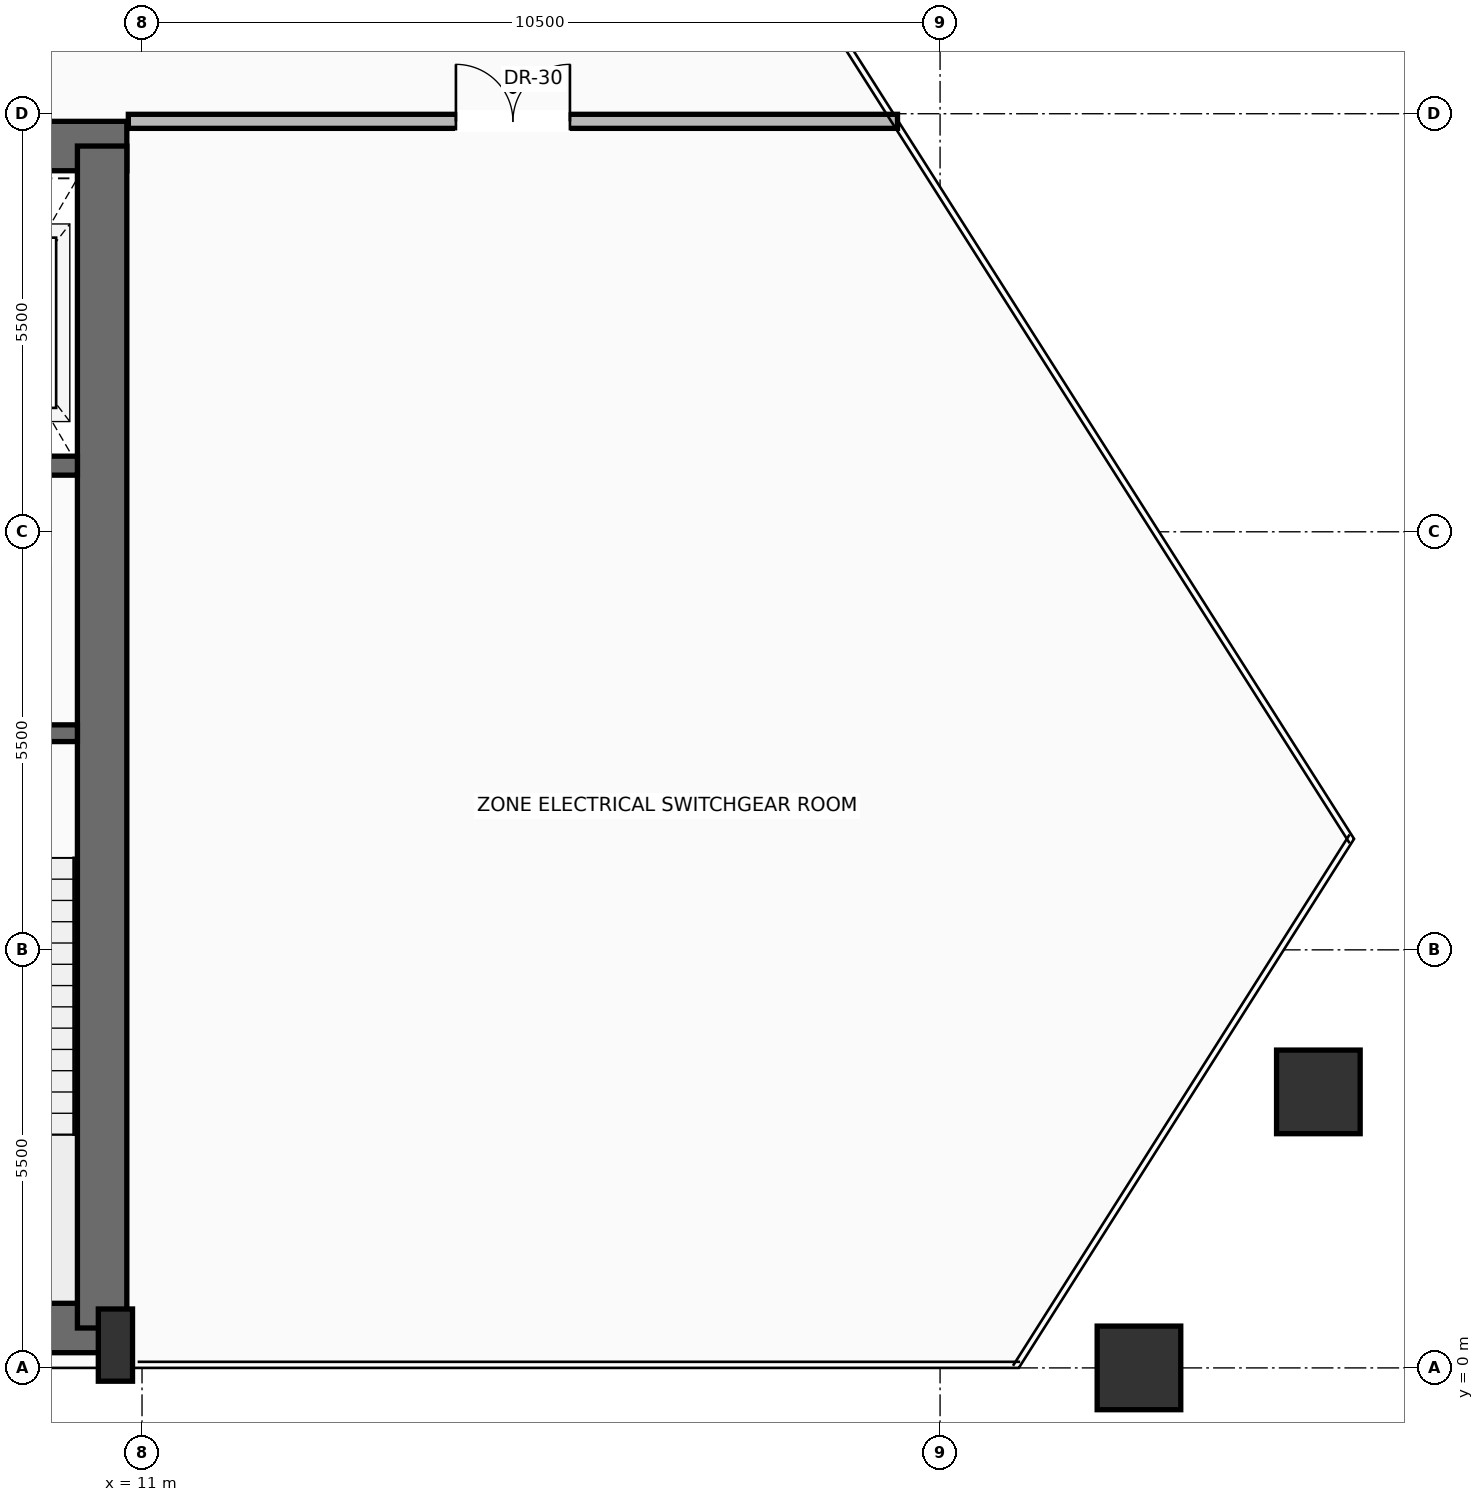
"""IFC4 building model, lengths in metres.
Left out: names, types, materials, properties, quantities, classifications, styles, units other than length and angle.
Written with IfcOpenShell. Run it as: python <this file> out.ifc"""

import sys

from ifc_helpers import new_model, si_unit, direction, frame, frame_2d, origin, origin_2d, place, context, subcontext, project, spatial, rectangle, hollow_rectangle, extrude, source, transform, mapped, element, fill, save


model = new_model("IFC4")
c1 = context("Model", 3, precision=1e-05, world=origin(), true_north=direction((0.0, 1.0)))
c2 = subcontext(c1, "Body", "Model", "MODEL_VIEW")
j1 = project(units=[si_unit("LENGTHUNIT", "METRE"), si_unit("PLANEANGLEUNIT", "RADIAN")], contexts=[c1])
p1 = place(None, origin())
s1 = spatial("IfcSite", under=j1, at=p1, CompositionType="ELEMENT")
p2 = place(p1, origin())
s2 = spatial("IfcBuilding", under=s1, at=p2, CompositionType="ELEMENT")
p3 = place(p2, frame((0.0, 0.0, 166.3)))
s3 = spatial("IfcBuildingStorey", under=s2, at=p3, CompositionType="ELEMENT", Elevation=166.3)
p4 = place(p3, frame((-10.65, 0.525, 0.0), z_axis=(0.0, 0.0, 1.0), x_axis=(1.0, 0.0, 0.0)))
e1 = element("IfcWall", 1, at=p4, inside=s3, PredefinedType="SHEAR", context=c2, shape_type="SweptSolid", body=[
    extrude(rectangle(XDim=21.3, YDim=0.65, at=frame_2d((10.65, 0.0))), origin(), (0.0, 0.0, 1.0), 4.47),
])
p5 = place(p3, frame((-10.8, 16.075, 0.0), z_axis=(0.0, 0.0, 1.0), x_axis=(1.0, 0.0, 0.0)))
e2 = element("IfcWall", 2, at=p5, inside=s3, PredefinedType="SHEAR", context=c2, shape_type="SweptSolid", body=[
    extrude(rectangle(XDim=21.6, YDim=0.65, at=frame_2d((10.8, 0.0))), origin(), (0.0, 0.0, 1.0), 4.47),
])
p6 = place(p5, frame((3.37, 0.0, 0.0)))
e3 = element("IfcOpeningElement", 3, at=p6, cuts=e2, PredefinedType="OPENING", context=c2, shape_type="SweptSolid", body=[
    extrude(rectangle(XDim=1.3, YDim=2.3, at=frame_2d((0.65, 1.15))), frame((0.0, 0.335, 0.0), z_axis=(0.0, -1.0, 0.0), x_axis=(1.0, 0.0, 0.0)), (0.0, 0.0, 1.0), 0.67),
])
p7 = place(p5, frame((9.8, 0.0, 0.0)))
e4 = element("IfcOpeningElement", 4, at=p7, cuts=e2, PredefinedType="OPENING", context=c2, shape_type="SweptSolid", body=[
    extrude(rectangle(XDim=2.0, YDim=2.4, at=frame_2d((1.0, 1.2))), frame((0.0, 0.335, 0.0), z_axis=(0.0, -1.0, 0.0), x_axis=(1.0, 0.0, 0.0)), (0.0, 0.0, 1.0), 0.67),
])
p8 = place(p3, frame((10.475, 0.525, 0.0), z_axis=(0.0, 0.0, 1.0), x_axis=(0.0, 1.0, 0.0)))
e5 = element("IfcWall", 5, at=p8, inside=s3, PredefinedType="SHEAR", context=c2, shape_type="SweptSolid", body=[
    extrude(rectangle(XDim=15.55, YDim=0.65, at=frame_2d((7.775, 0.0))), origin(), (0.0, 0.0, 1.0), 4.47),
])
m1 = source(origin(), c2, "Body", "SweptSolid", [
    extrude(rectangle(XDim=0.45, YDim=0.95, at=origin_2d()), origin(), (0.0, 0.0, 1.0), 4.7),
])
p9 = place(p3, frame((10.65, 0.3, 0.0), z_axis=(0.0, 0.0, 1.0), x_axis=(1.0, 0.0, 0.0)))
e6 = element("IfcColumn", 6, at=p9, inside=s3, PredefinedType="PILASTER", context=c2, shape_type="MappedRepresentation", body=[
    mapped(m1, transform((0.0, 0.0, 0.0), scale=1.0)),
])
m2 = source(origin(), c2, "Body", "SweptSolid", [
    extrude(hollow_rectangle(XDim=1.1, YDim=1.1, WallThickness=0.055, at=origin_2d()), origin(), (0.0, 0.0, 1.0), 4.691),
])
p10 = place(p3, frame((24.117, 0.0, 0.004), z_axis=(0.006765392916, 0.0, 0.999977114467), x_axis=(0.0, 1.0, 0.0)))
e7 = element("IfcColumn", 7, at=p10, inside=s3, PredefinedType="COLUMN", context=c2, shape_type="MappedRepresentation", body=[
    mapped(m2, transform((0.0, 0.0, 0.0), scale=1.0)),
])
m3 = source(origin(), c2, "Body", "SweptSolid", [
    extrude(hollow_rectangle(XDim=1.1, YDim=1.1, WallThickness=0.055, at=origin_2d()), origin(), (0.0, 0.0, 1.0), 4.692),
])
p11 = place(p3, frame((26.477, 3.631, 0.004), z_axis=(-0.005255651366, -0.014934375665, 0.999874663421), x_axis=(0.943293332831, -0.331960371484, 0.0)))
e8 = element("IfcColumn", 8, at=p11, inside=s3, PredefinedType="COLUMN", context=c2, shape_type="MappedRepresentation", body=[
    mapped(m3, transform((0.0, 0.0, 0.0), scale=1.0)),
])
p12 = place(p3, frame((10.15, 8.35, 0.0), z_axis=(0.0, 0.0, 1.0), x_axis=(-1.0, 0.0, 0.0)))
e9 = element("IfcWall", 9, at=p12, inside=s3, PredefinedType="SOLIDWALL", context=c2, shape_type="SweptSolid", body=[
    extrude(rectangle(XDim=4.65, YDim=0.22, at=frame_2d((2.325, 0.0))), origin(), (0.0, 0.0, 1.0), 4.47),
])
p13 = place(p12, frame((1.0, 0.0, 0.0)))
e10 = element("IfcOpeningElement", 10, at=p13, cuts=e9, PredefinedType="OPENING", context=c2, shape_type="SweptSolid", body=[
    extrude(rectangle(XDim=1.15, YDim=2.2, at=frame_2d((0.575, 1.1))), frame((0.0, 0.12, 0.0), z_axis=(0.0, -1.0, 0.0), x_axis=(1.0, 0.0, 0.0)), (0.0, 0.0, 1.0), 0.24),
])
p14 = place(p3, frame((10.15, 11.87, 0.0), z_axis=(0.0, 0.0, 1.0), x_axis=(-1.0, 0.0, 0.0)))
e11 = element("IfcWall", 11, at=p14, inside=s3, PredefinedType="SOLIDWALL", context=c2, shape_type="SweptSolid", body=[
    extrude(rectangle(XDim=4.65, YDim=0.25, at=frame_2d((2.325, 0.0))), origin(), (0.0, 0.0, 1.0), 4.47),
])
p15 = place(p14, frame((0.5, 0.0, 0.0)))
e12 = element("IfcOpeningElement", 12, at=p15, cuts=e11, PredefinedType="OPENING", context=c2, shape_type="SweptSolid", body=[
    extrude(rectangle(XDim=1.2, YDim=2.25, at=frame_2d((0.6, 1.125))), frame((0.0, 0.135, 0.0), z_axis=(0.0, -1.0, 0.0), x_axis=(1.0, 0.0, 0.0)), (0.0, 0.0, 1.0), 0.27),
])
p16 = place(p3, frame((10.82, 16.4, 0.0), z_axis=(0.0, 0.0, 1.0), x_axis=(1.0, 0.0, 0.0)))
e13 = element("IfcWall", 13, at=p16, inside=s3, PredefinedType="PARTITIONING", context=c2, shape_type="SweptSolid", body=[
    extrude(rectangle(XDim=10.12, YDim=0.185, at=frame_2d((5.06, 0.0))), origin(), (0.0, 0.0, 1.0), 4.462),
])
p17 = place(p16, frame((4.31, 0.0, 0.0)))
e14 = element("IfcOpeningElement", 14, at=p17, cuts=e13, PredefinedType="OPENING", context=c2, shape_type="SweptSolid", body=[
    extrude(rectangle(XDim=1.5, YDim=2.25, at=frame_2d((0.75, 1.125))), frame((0.0, 0.103, 0.0), z_axis=(0.0, -1.0, 0.0), x_axis=(1.0, 0.0, 0.0)), (0.0, 0.0, 1.0), 0.205),
])
m4 = source(origin(), c2, "Body", "SweptSolid", [
    extrude(rectangle(XDim=1.5, YDim=2.25, at=frame_2d((0.75, 1.125))), frame((0.0, 0.025, 0.0), z_axis=(0.0, -1.0, 0.0), x_axis=(1.0, 0.0, 0.0)), (0.0, 0.0, 1.0), 0.05),
])
p18 = place(p17, origin())
e15 = element("IfcDoor", 15, at=p18, inside=s3, OperationType="DOUBLE_DOOR_SINGLE_SWING", PredefinedType="DOOR", context=c2, shape_type="MappedRepresentation", body=[
    mapped(m4, transform((0.0, 0.0, 0.0), scale=1.0)),
])
fill(e14, e15)
save(model, sys.argv[1])
